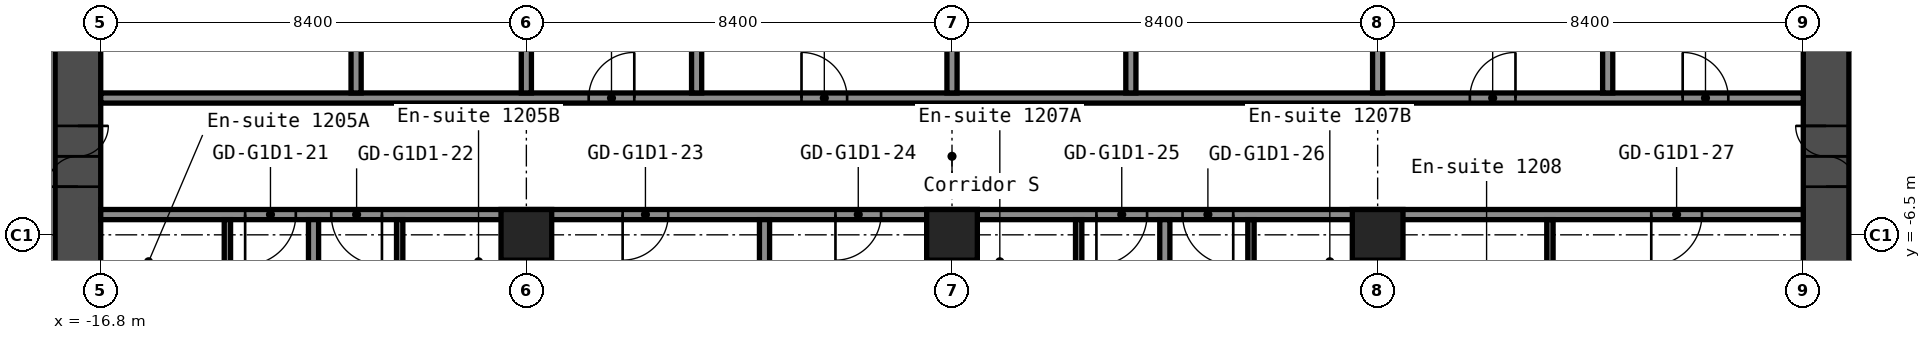
"""IFC4 building model, lengths in metres.
Left out: names, types, materials, properties, quantities, classifications, styles, units other than length and angle.
Written with IfcOpenShell. Run it as: python <this file> out.ifc"""

import sys

from ifc_helpers import new_model, si_unit, direction, frame, frame_2d, origin, origin_2d, place, context, subcontext, project, spatial, rectangle, hollow_rectangle, extrude, element, fill, save


model = new_model("IFC4")
c1 = context("Model", 3, precision=1e-05, world=origin(), true_north=direction((0.0, 1.0)))
c2 = subcontext(c1, "Body", "Model", "MODEL_VIEW")
j1 = project(units=[si_unit("LENGTHUNIT", "METRE"), si_unit("PLANEANGLEUNIT", "RADIAN")], contexts=[c1])
p1 = place(None, origin())
s1 = spatial("IfcSite", under=j1, at=p1, CompositionType="ELEMENT")
p2 = place(p1, origin())
s2 = spatial("IfcBuilding", under=s1, at=p2, CompositionType="ELEMENT")
p3 = place(p2, frame((0.0, 0.0, 45.4)))
s3 = spatial("IfcBuildingStorey", under=s2, at=p3, CompositionType="ELEMENT", Elevation=45.4)
for number, where, z_axis, x_axis in (
    (1, (-8.4, -6.5, 0.0), (0.0, 0.0, 1.0), (1.0, 0.0, 0.0)),
    (2, (0.0, -6.5, 0.0), (0.0, 0.0, 1.0), (1.0, 0.0, 0.0)),
    (3, (8.4, -6.5, 0.0), (0.0, 0.0, 1.0), (1.0, 0.0, 0.0)),
):
    element("IfcColumn", number, at=place(p3, frame(where, z_axis=z_axis, x_axis=x_axis)), inside=s3, PredefinedType="COLUMN", context=c2, shape_type="SweptSolid", body=[
        extrude(hollow_rectangle(XDim=1.0, YDim=1.0, WallThickness=0.04, at=origin_2d()), origin(), (0.0, 0.0, 1.0), 2.8),
    ])
p4 = place(p3, frame((-17.25, -8.4, 0.0), z_axis=(0.0, 0.0, 1.0), x_axis=(0.0, 1.0, 0.0)))
e4 = element("IfcWall", 4, at=p4, inside=s3, PredefinedType="SHEAR", context=c2, shape_type="SweptSolid", body=[
    extrude(rectangle(XDim=16.8, YDim=0.9, at=frame_2d((8.4, 0.0))), origin(), (0.0, 0.0, 1.0), 2.8),
])
p5 = place(p4, frame((12.75, 0.0, 0.0)))
e5 = element("IfcOpeningElement", 5, at=p5, cuts=e4, PredefinedType="OPENING", context=c2, shape_type="SweptSolid", body=[
    extrude(rectangle(XDim=1.2, YDim=2.1, at=frame_2d((0.6, 1.05))), frame((0.0, 0.46, 0.0), z_axis=(0.0, -1.0, 0.0), x_axis=(1.0, 0.0, 0.0)), (0.0, 0.0, 1.0), 0.92),
])
p6 = place(p4, frame((2.85, 0.0, 0.0)))
e6 = element("IfcOpeningElement", 6, at=p6, cuts=e4, PredefinedType="OPENING", context=c2, shape_type="SweptSolid", body=[
    extrude(rectangle(XDim=1.2, YDim=2.1, at=frame_2d((0.6, 1.05))), frame((0.0, 0.46, 0.0), z_axis=(0.0, -1.0, 0.0), x_axis=(1.0, 0.0, 0.0)), (0.0, 0.0, 1.0), 0.92),
])
p7 = place(p3, frame((17.25, -8.4, 0.0), z_axis=(0.0, 0.0, 1.0), x_axis=(0.0, 1.0, 0.0)))
e7 = element("IfcWall", 7, at=p7, inside=s3, PredefinedType="SHEAR", context=c2, shape_type="SweptSolid", body=[
    extrude(rectangle(XDim=16.8, YDim=0.9, at=frame_2d((8.4, 0.0))), origin(), (0.0, 0.0, 1.0), 2.8),
])
p8 = place(p7, frame((12.75, 0.0, 0.0)))
e8 = element("IfcOpeningElement", 8, at=p8, cuts=e7, PredefinedType="OPENING", context=c2, shape_type="SweptSolid", body=[
    extrude(rectangle(XDim=1.2, YDim=2.1, at=frame_2d((0.6, 1.05))), frame((0.0, 0.46, 0.0), z_axis=(0.0, -1.0, 0.0), x_axis=(1.0, 0.0, 0.0)), (0.0, 0.0, 1.0), 0.92),
])
p9 = place(p7, frame((2.85, 0.0, 0.0)))
e9 = element("IfcOpeningElement", 9, at=p9, cuts=e7, PredefinedType="OPENING", context=c2, shape_type="SweptSolid", body=[
    extrude(rectangle(XDim=1.2, YDim=2.1, at=frame_2d((0.6, 1.05))), frame((0.0, 0.46, 0.0), z_axis=(0.0, -1.0, 0.0), x_axis=(1.0, 0.0, 0.0)), (0.0, 0.0, 1.0), 0.92),
])
p10 = place(p3, frame((-16.8, -6.1, 0.0), z_axis=(0.0, 0.0, 1.0), x_axis=(1.0, 0.0, 0.0)))
e10 = element("IfcWall", 10, at=p10, inside=s3, PredefinedType="PARTITIONING", context=c2, shape_type="SweptSolid", body=[
    extrude(rectangle(XDim=33.6, YDim=0.2, at=frame_2d((16.8, 0.0))), origin(), (0.0, 0.0, 1.0), 2.8),
])
p11 = place(p10, frame((2.85, 0.0, 0.0)))
e11 = element("IfcOpeningElement", 11, at=p11, cuts=e10, PredefinedType="OPENING", context=c2, shape_type="SweptSolid", body=[
    extrude(rectangle(XDim=1.0, YDim=2.1, at=frame_2d((0.5, 1.05))), frame((0.0, 0.11, 0.0), z_axis=(0.0, -1.0, 0.0), x_axis=(1.0, 0.0, 0.0)), (0.0, 0.0, 1.0), 0.22),
])
p12 = place(p10, frame((4.55, 0.0, 0.0)))
e12 = element("IfcOpeningElement", 12, at=p12, cuts=e10, PredefinedType="OPENING", context=c2, shape_type="SweptSolid", body=[
    extrude(rectangle(XDim=1.0, YDim=2.1, at=frame_2d((0.5, 1.05))), frame((0.0, 0.11, 0.0), z_axis=(0.0, -1.0, 0.0), x_axis=(1.0, 0.0, 0.0)), (0.0, 0.0, 1.0), 0.22),
])
p13 = place(p10, frame((10.3, 0.0, 0.0)))
e13 = element("IfcOpeningElement", 13, at=p13, cuts=e10, PredefinedType="OPENING", context=c2, shape_type="SweptSolid", body=[
    extrude(rectangle(XDim=0.9, YDim=2.1, at=frame_2d((0.45, 1.05))), frame((0.0, 0.11, 0.0), z_axis=(0.0, -1.0, 0.0), x_axis=(1.0, 0.0, 0.0)), (0.0, 0.0, 1.0), 0.22),
])
p14 = place(p10, frame((14.5, 0.0, 0.0)))
e14 = element("IfcOpeningElement", 14, at=p14, cuts=e10, PredefinedType="OPENING", context=c2, shape_type="SweptSolid", body=[
    extrude(rectangle(XDim=0.9, YDim=2.1, at=frame_2d((0.45, 1.05))), frame((0.0, 0.11, 0.0), z_axis=(0.0, -1.0, 0.0), x_axis=(1.0, 0.0, 0.0)), (0.0, 0.0, 1.0), 0.22),
])
p15 = place(p10, frame((19.65, 0.0, 0.0)))
e15 = element("IfcOpeningElement", 15, at=p15, cuts=e10, PredefinedType="OPENING", context=c2, shape_type="SweptSolid", body=[
    extrude(rectangle(XDim=1.0, YDim=2.1, at=frame_2d((0.5, 1.05))), frame((0.0, 0.11, 0.0), z_axis=(0.0, -1.0, 0.0), x_axis=(1.0, 0.0, 0.0)), (0.0, 0.0, 1.0), 0.22),
])
p16 = place(p10, frame((21.35, 0.0, 0.0)))
e16 = element("IfcOpeningElement", 16, at=p16, cuts=e10, PredefinedType="OPENING", context=c2, shape_type="SweptSolid", body=[
    extrude(rectangle(XDim=1.0, YDim=2.1, at=frame_2d((0.5, 1.05))), frame((0.0, 0.11, 0.0), z_axis=(0.0, -1.0, 0.0), x_axis=(1.0, 0.0, 0.0)), (0.0, 0.0, 1.0), 0.22),
])
p17 = place(p10, frame((30.6, 0.0, 0.0)))
e17 = element("IfcOpeningElement", 17, at=p17, cuts=e10, PredefinedType="OPENING", context=c2, shape_type="SweptSolid", body=[
    extrude(rectangle(XDim=1.0, YDim=2.1, at=frame_2d((0.5, 1.05))), frame((0.0, 0.11, 0.0), z_axis=(0.0, -1.0, 0.0), x_axis=(1.0, 0.0, 0.0)), (0.0, 0.0, 1.0), 0.22),
])
p18 = place(p3, frame((-16.8, -3.8, 0.0), z_axis=(0.0, 0.0, 1.0), x_axis=(1.0, 0.0, 0.0)))
e18 = element("IfcWall", 18, at=p18, inside=s3, PredefinedType="PARTITIONING", context=c2, shape_type="SweptSolid", body=[
    extrude(rectangle(XDim=33.6, YDim=0.2, at=frame_2d((16.8, 0.0))), origin(), (0.0, 0.0, 1.0), 2.8),
])
p19 = place(p18, frame((9.63, 0.0, 0.0)))
e19 = element("IfcOpeningElement", 19, at=p19, cuts=e18, PredefinedType="OPENING", context=c2, shape_type="SweptSolid", body=[
    extrude(rectangle(XDim=0.9, YDim=2.1, at=frame_2d((0.45, 1.05))), frame((0.0, 0.11, 0.0), z_axis=(0.0, -1.0, 0.0), x_axis=(1.0, 0.0, 0.0)), (0.0, 0.0, 1.0), 0.22),
])
p20 = place(p18, frame((13.83, 0.0, 0.0)))
e20 = element("IfcOpeningElement", 20, at=p20, cuts=e18, PredefinedType="OPENING", context=c2, shape_type="SweptSolid", body=[
    extrude(rectangle(XDim=0.9, YDim=2.1, at=frame_2d((0.45, 1.05))), frame((0.0, 0.11, 0.0), z_axis=(0.0, -1.0, 0.0), x_axis=(1.0, 0.0, 0.0)), (0.0, 0.0, 1.0), 0.22),
])
p21 = place(p18, frame((27.02, 0.0, 0.0)))
e21 = element("IfcOpeningElement", 21, at=p21, cuts=e18, PredefinedType="OPENING", context=c2, shape_type="SweptSolid", body=[
    extrude(rectangle(XDim=0.9, YDim=2.1, at=frame_2d((0.45, 1.05))), frame((0.0, 0.11, 0.0), z_axis=(0.0, -1.0, 0.0), x_axis=(1.0, 0.0, 0.0)), (0.0, 0.0, 1.0), 0.22),
])
p22 = place(p18, frame((31.22, 0.0, 0.0)))
e22 = element("IfcOpeningElement", 22, at=p22, cuts=e18, PredefinedType="OPENING", context=c2, shape_type="SweptSolid", body=[
    extrude(rectangle(XDim=0.9, YDim=2.1, at=frame_2d((0.45, 1.05))), frame((0.0, 0.11, 0.0), z_axis=(0.0, -1.0, 0.0), x_axis=(1.0, 0.0, 0.0)), (0.0, 0.0, 1.0), 0.22),
])
p23 = place(p3, frame((-14.3, -9.1, 0.0), z_axis=(0.0, 0.0, 1.0), x_axis=(0.0, 1.0, 0.0)))
e23 = element("IfcWall", 23, at=p23, inside=s3, PredefinedType="PARTITIONING", context=c2, shape_type="SweptSolid", body=[
    extrude(rectangle(XDim=2.9, YDim=0.125, at=frame_2d((1.45, 0.0))), origin(), (0.0, 0.0, 1.0), 2.8),
])
p24 = place(p23, frame((0.6, 0.0, 0.0)))
e24 = element("IfcOpeningElement", 24, at=p24, cuts=e23, PredefinedType="OPENING", context=c2, shape_type="SweptSolid", body=[
    extrude(rectangle(XDim=0.8, YDim=2.1, at=frame_2d((0.4, 1.05))), frame((0.0, 0.073, 0.0), z_axis=(0.0, -1.0, 0.0), x_axis=(1.0, 0.0, 0.0)), (0.0, 0.0, 1.0), 0.145),
])
p25 = place(p3, frame((-12.6, -20.3, 0.0), z_axis=(0.0, 0.0, 1.0), x_axis=(0.0, 1.0, 0.0)))
e25 = element("IfcWall", 25, at=p25, inside=s3, PredefinedType="PARTITIONING", context=c2, shape_type="SweptSolid", body=[
    extrude(rectangle(XDim=14.1, YDim=0.2, at=frame_2d((7.05, 0.0))), origin(), (0.0, 0.0, 1.0), 2.8),
])
p26 = place(p3, frame((-11.76, -3.7, 0.0), z_axis=(0.0, 0.0, 1.0), x_axis=(0.0, 1.0, 0.0)))
e26 = element("IfcWall", 26, at=p26, inside=s3, PredefinedType="PARTITIONING", context=c2, shape_type="SweptSolid", body=[
    extrude(rectangle(XDim=7.4, YDim=0.2, at=frame_2d((3.7, 0.0))), origin(), (0.0, 0.0, 1.0), 2.8),
])
p27 = place(p3, frame((-10.9, -9.1, 0.0), z_axis=(0.0, 0.0, 1.0), x_axis=(0.0, 1.0, 0.0)))
e27 = element("IfcWall", 27, at=p27, inside=s3, PredefinedType="PARTITIONING", context=c2, shape_type="SweptSolid", body=[
    extrude(rectangle(XDim=2.9, YDim=0.125, at=frame_2d((1.45, 0.0))), origin(), (0.0, 0.0, 1.0), 2.8),
])
p28 = place(p27, frame((0.6, 0.0, 0.0)))
e28 = element("IfcOpeningElement", 28, at=p28, cuts=e27, PredefinedType="OPENING", context=c2, shape_type="SweptSolid", body=[
    extrude(rectangle(XDim=0.8, YDim=2.1, at=frame_2d((0.4, 1.05))), frame((0.0, 0.073, 0.0), z_axis=(0.0, -1.0, 0.0), x_axis=(1.0, 0.0, 0.0)), (0.0, 0.0, 1.0), 0.145),
])
p29 = place(p3, frame((-8.4, -20.3, 0.0), z_axis=(0.0, 0.0, 1.0), x_axis=(0.0, 1.0, 0.0)))
e29 = element("IfcWall", 29, at=p29, inside=s3, PredefinedType="PARTITIONING", context=c2, shape_type="SweptSolid", body=[
    extrude(rectangle(XDim=13.31, YDim=0.2, at=frame_2d((6.655, 0.0))), origin(), (0.0, 0.0, 1.0), 2.8),
])
for number, where, z_axis, x_axis in (
    (30, (-8.4, -3.7, 0.0), (0.0, 0.0, 1.0), (0.0, 1.0, 0.0)),
    (31, (-5.04, -3.7, 0.0), (0.0, 0.0, 1.0), (0.0, 1.0, 0.0)),
):
    element("IfcWall", number, at=place(p3, frame(where, z_axis=z_axis, x_axis=x_axis)), inside=s3, PredefinedType="PARTITIONING", context=c2, shape_type="SweptSolid", body=[
        extrude(rectangle(XDim=7.4, YDim=0.2, at=frame_2d((3.7, 0.0))), origin(), (0.0, 0.0, 1.0), 2.8),
    ])
p30 = place(p3, frame((-3.7, -20.3, 0.0), z_axis=(0.0, 0.0, 1.0), x_axis=(0.0, 1.0, 0.0)))
e32 = element("IfcWall", 32, at=p30, inside=s3, PredefinedType="PARTITIONING", context=c2, shape_type="SweptSolid", body=[
    extrude(rectangle(XDim=14.1, YDim=0.2, at=frame_2d((7.05, 0.0))), origin(), (0.0, 0.0, 1.0), 2.8),
])
p31 = place(p3, frame((0.0, -20.3, 0.0), z_axis=(0.0, 0.0, 1.0), x_axis=(0.0, 1.0, 0.0)))
e33 = element("IfcWall", 33, at=p31, inside=s3, PredefinedType="PARTITIONING", context=c2, shape_type="SweptSolid", body=[
    extrude(rectangle(XDim=13.31, YDim=0.2, at=frame_2d((6.655, 0.0))), origin(), (0.0, 0.0, 1.0), 2.8),
])
p32 = place(p3, frame((0.0, -3.7, 0.0), z_axis=(0.0, 0.0, 1.0), x_axis=(0.0, 1.0, 0.0)))
e34 = element("IfcWall", 34, at=p32, inside=s3, PredefinedType="PARTITIONING", context=c2, shape_type="SweptSolid", body=[
    extrude(rectangle(XDim=7.4, YDim=0.2, at=frame_2d((3.7, 0.0))), origin(), (0.0, 0.0, 1.0), 2.8),
])
p33 = place(p3, frame((2.5, -9.1, 0.0), z_axis=(0.0, 0.0, 1.0), x_axis=(0.0, 1.0, 0.0)))
e35 = element("IfcWall", 35, at=p33, inside=s3, PredefinedType="PARTITIONING", context=c2, shape_type="SweptSolid", body=[
    extrude(rectangle(XDim=2.9, YDim=0.125, at=frame_2d((1.45, 0.0))), origin(), (0.0, 0.0, 1.0), 2.8),
])
p34 = place(p33, frame((0.6, 0.0, 0.0)))
e36 = element("IfcOpeningElement", 36, at=p34, cuts=e35, PredefinedType="OPENING", context=c2, shape_type="SweptSolid", body=[
    extrude(rectangle(XDim=0.8, YDim=2.1, at=frame_2d((0.4, 1.05))), frame((0.0, 0.073, 0.0), z_axis=(0.0, -1.0, 0.0), x_axis=(1.0, 0.0, 0.0)), (0.0, 0.0, 1.0), 0.145),
])
p35 = place(p3, frame((3.53, -3.7, 0.0), z_axis=(0.0, 0.0, 1.0), x_axis=(0.0, 1.0, 0.0)))
e37 = element("IfcWall", 37, at=p35, inside=s3, PredefinedType="PARTITIONING", context=c2, shape_type="SweptSolid", body=[
    extrude(rectangle(XDim=7.4, YDim=0.2, at=frame_2d((3.7, 0.0))), origin(), (0.0, 0.0, 1.0), 2.8),
])
p36 = place(p3, frame((4.2, -20.3, 0.0), z_axis=(0.0, 0.0, 1.0), x_axis=(0.0, 1.0, 0.0)))
e38 = element("IfcWall", 38, at=p36, inside=s3, PredefinedType="PARTITIONING", context=c2, shape_type="SweptSolid", body=[
    extrude(rectangle(XDim=14.1, YDim=0.2, at=frame_2d((7.05, 0.0))), origin(), (0.0, 0.0, 1.0), 2.8),
])
p37 = place(p3, frame((5.9, -9.1, 0.0), z_axis=(0.0, 0.0, 1.0), x_axis=(0.0, 1.0, 0.0)))
e39 = element("IfcWall", 39, at=p37, inside=s3, PredefinedType="PARTITIONING", context=c2, shape_type="SweptSolid", body=[
    extrude(rectangle(XDim=2.9, YDim=0.125, at=frame_2d((1.45, 0.0))), origin(), (0.0, 0.0, 1.0), 2.8),
])
p38 = place(p37, frame((0.6, 0.0, 0.0)))
e40 = element("IfcOpeningElement", 40, at=p38, cuts=e39, PredefinedType="OPENING", context=c2, shape_type="SweptSolid", body=[
    extrude(rectangle(XDim=0.8, YDim=2.1, at=frame_2d((0.4, 1.05))), frame((0.0, 0.073, 0.0), z_axis=(0.0, -1.0, 0.0), x_axis=(1.0, 0.0, 0.0)), (0.0, 0.0, 1.0), 0.145),
])
p39 = place(p3, frame((8.4, -20.3, 0.0), z_axis=(0.0, 0.0, 1.0), x_axis=(0.0, 1.0, 0.0)))
e41 = element("IfcWall", 41, at=p39, inside=s3, PredefinedType="PARTITIONING", context=c2, shape_type="SweptSolid", body=[
    extrude(rectangle(XDim=13.31, YDim=0.2, at=frame_2d((6.655, 0.0))), origin(), (0.0, 0.0, 1.0), 2.8),
])
p40 = place(p3, frame((8.4, -3.7, 0.0), z_axis=(0.0, 0.0, 1.0), x_axis=(0.0, 1.0, 0.0)))
e42 = element("IfcWall", 42, at=p40, inside=s3, PredefinedType="PARTITIONING", context=c2, shape_type="SweptSolid", body=[
    extrude(rectangle(XDim=7.4, YDim=0.2, at=frame_2d((3.7, 0.0))), origin(), (0.0, 0.0, 1.0), 2.8),
])
p41 = place(p3, frame((11.8, -9.5, 0.0), z_axis=(0.0, 0.0, 1.0), x_axis=(0.0, 1.0, 0.0)))
e43 = element("IfcWall", 43, at=p41, inside=s3, PredefinedType="PARTITIONING", context=c2, shape_type="SweptSolid", body=[
    extrude(rectangle(XDim=3.3, YDim=0.125, at=frame_2d((1.65, 0.0))), origin(), (0.0, 0.0, 1.0), 2.8),
])
p42 = place(p3, frame((12.94, -3.7, 0.0), z_axis=(0.0, 0.0, 1.0), x_axis=(0.0, 1.0, 0.0)))
e44 = element("IfcWall", 44, at=p42, inside=s3, PredefinedType="PARTITIONING", context=c2, shape_type="SweptSolid", body=[
    extrude(rectangle(XDim=7.4, YDim=0.2, at=frame_2d((3.7, 0.0))), origin(), (0.0, 0.0, 1.0), 2.8),
])
p43 = place(p6, origin())
e45 = element("IfcDoor", 45, at=p43, inside=s3, OperationType="DOUBLE_DOOR_SINGLE_SWING", PredefinedType="DOOR", context=c2, shape_type="SweptSolid", body=[
    extrude(rectangle(XDim=1.2, YDim=2.1, at=frame_2d((0.6, 1.05))), frame((0.0, 0.025, 0.0), z_axis=(0.0, -1.0, 0.0), x_axis=(1.0, 0.0, 0.0)), (0.0, 0.0, 1.0), 0.05),
])
fill(e6, e45)
p44 = place(p9, origin())
e46 = element("IfcDoor", 46, at=p44, inside=s3, OperationType="DOUBLE_DOOR_SINGLE_SWING", PredefinedType="DOOR", context=c2, shape_type="SweptSolid", body=[
    extrude(rectangle(XDim=1.2, YDim=2.1, at=frame_2d((0.6, 1.05))), frame((0.0, 0.025, 0.0), z_axis=(0.0, -1.0, 0.0), x_axis=(1.0, 0.0, 0.0)), (0.0, 0.0, 1.0), 0.05),
])
fill(e9, e46)
p45 = place(p11, origin())
e47 = element("IfcDoor", 47, at=p45, inside=s3, OperationType="SINGLE_SWING_LEFT", PredefinedType="DOOR", context=c2, shape_type="SweptSolid", body=[
    extrude(rectangle(XDim=1.0, YDim=2.1, at=frame_2d((0.5, 1.05))), frame((0.0, 0.025, 0.0), z_axis=(0.0, -1.0, 0.0), x_axis=(1.0, 0.0, 0.0)), (0.0, 0.0, 1.0), 0.05),
])
fill(e11, e47)
p46 = place(p12, origin())
e48 = element("IfcDoor", 48, at=p46, inside=s3, OperationType="SINGLE_SWING_RIGHT", PredefinedType="DOOR", context=c2, shape_type="SweptSolid", body=[
    extrude(rectangle(XDim=1.0, YDim=2.1, at=frame_2d((0.5, 1.05))), frame((0.0, 0.025, 0.0), z_axis=(0.0, -1.0, 0.0), x_axis=(1.0, 0.0, 0.0)), (0.0, 0.0, 1.0), 0.05),
])
fill(e12, e48)
p47 = place(p13, origin())
e49 = element("IfcDoor", 49, at=p47, inside=s3, OperationType="SINGLE_SWING_LEFT", PredefinedType="DOOR", context=c2, shape_type="SweptSolid", body=[
    extrude(rectangle(XDim=0.9, YDim=2.1, at=frame_2d((0.45, 1.05))), frame((0.0, 0.025, 0.0), z_axis=(0.0, -1.0, 0.0), x_axis=(1.0, 0.0, 0.0)), (0.0, 0.0, 1.0), 0.05),
])
fill(e13, e49)
p48 = place(p14, origin())
e50 = element("IfcDoor", 50, at=p48, inside=s3, OperationType="SINGLE_SWING_LEFT", PredefinedType="DOOR", context=c2, shape_type="SweptSolid", body=[
    extrude(rectangle(XDim=0.9, YDim=2.1, at=frame_2d((0.45, 1.05))), frame((0.0, 0.025, 0.0), z_axis=(0.0, -1.0, 0.0), x_axis=(1.0, 0.0, 0.0)), (0.0, 0.0, 1.0), 0.05),
])
fill(e14, e50)
p49 = place(p15, origin())
e51 = element("IfcDoor", 51, at=p49, inside=s3, OperationType="SINGLE_SWING_LEFT", PredefinedType="DOOR", context=c2, shape_type="SweptSolid", body=[
    extrude(rectangle(XDim=1.0, YDim=2.1, at=frame_2d((0.5, 1.05))), frame((0.0, 0.025, 0.0), z_axis=(0.0, -1.0, 0.0), x_axis=(1.0, 0.0, 0.0)), (0.0, 0.0, 1.0), 0.05),
])
fill(e15, e51)
p50 = place(p16, origin())
e52 = element("IfcDoor", 52, at=p50, inside=s3, OperationType="SINGLE_SWING_RIGHT", PredefinedType="DOOR", context=c2, shape_type="SweptSolid", body=[
    extrude(rectangle(XDim=1.0, YDim=2.1, at=frame_2d((0.5, 1.05))), frame((0.0, 0.025, 0.0), z_axis=(0.0, -1.0, 0.0), x_axis=(1.0, 0.0, 0.0)), (0.0, 0.0, 1.0), 0.05),
])
fill(e16, e52)
p51 = place(p17, origin())
e53 = element("IfcDoor", 53, at=p51, inside=s3, OperationType="SINGLE_SWING_LEFT", PredefinedType="DOOR", context=c2, shape_type="SweptSolid", body=[
    extrude(rectangle(XDim=1.0, YDim=2.1, at=frame_2d((0.5, 1.05))), frame((0.0, 0.025, 0.0), z_axis=(0.0, -1.0, 0.0), x_axis=(1.0, 0.0, 0.0)), (0.0, 0.0, 1.0), 0.05),
])
fill(e17, e53)
p52 = place(p19, origin())
e54 = element("IfcDoor", 54, at=p52, inside=s3, OperationType="SINGLE_SWING_LEFT", PredefinedType="DOOR", context=c2, shape_type="SweptSolid", body=[
    extrude(rectangle(XDim=0.9, YDim=2.1, at=frame_2d((0.45, 1.05))), frame((0.0, 0.025, 0.0), z_axis=(0.0, -1.0, 0.0), x_axis=(1.0, 0.0, 0.0)), (0.0, 0.0, 1.0), 0.05),
])
fill(e19, e54)
p53 = place(p20, origin())
e55 = element("IfcDoor", 55, at=p53, inside=s3, OperationType="SINGLE_SWING_RIGHT", PredefinedType="DOOR", context=c2, shape_type="SweptSolid", body=[
    extrude(rectangle(XDim=0.9, YDim=2.1, at=frame_2d((0.45, 1.05))), frame((0.0, 0.025, 0.0), z_axis=(0.0, -1.0, 0.0), x_axis=(1.0, 0.0, 0.0)), (0.0, 0.0, 1.0), 0.05),
])
fill(e20, e55)
p54 = place(p21, origin())
e56 = element("IfcDoor", 56, at=p54, inside=s3, OperationType="SINGLE_SWING_LEFT", PredefinedType="DOOR", context=c2, shape_type="SweptSolid", body=[
    extrude(rectangle(XDim=0.9, YDim=2.1, at=frame_2d((0.45, 1.05))), frame((0.0, 0.025, 0.0), z_axis=(0.0, -1.0, 0.0), x_axis=(1.0, 0.0, 0.0)), (0.0, 0.0, 1.0), 0.05),
])
fill(e21, e56)
p55 = place(p22, origin())
e57 = element("IfcDoor", 57, at=p55, inside=s3, OperationType="SINGLE_SWING_RIGHT", PredefinedType="DOOR", context=c2, shape_type="SweptSolid", body=[
    extrude(rectangle(XDim=0.9, YDim=2.1, at=frame_2d((0.45, 1.05))), frame((0.0, 0.025, 0.0), z_axis=(0.0, -1.0, 0.0), x_axis=(1.0, 0.0, 0.0)), (0.0, 0.0, 1.0), 0.05),
])
fill(e22, e57)
save(model, sys.argv[1])
